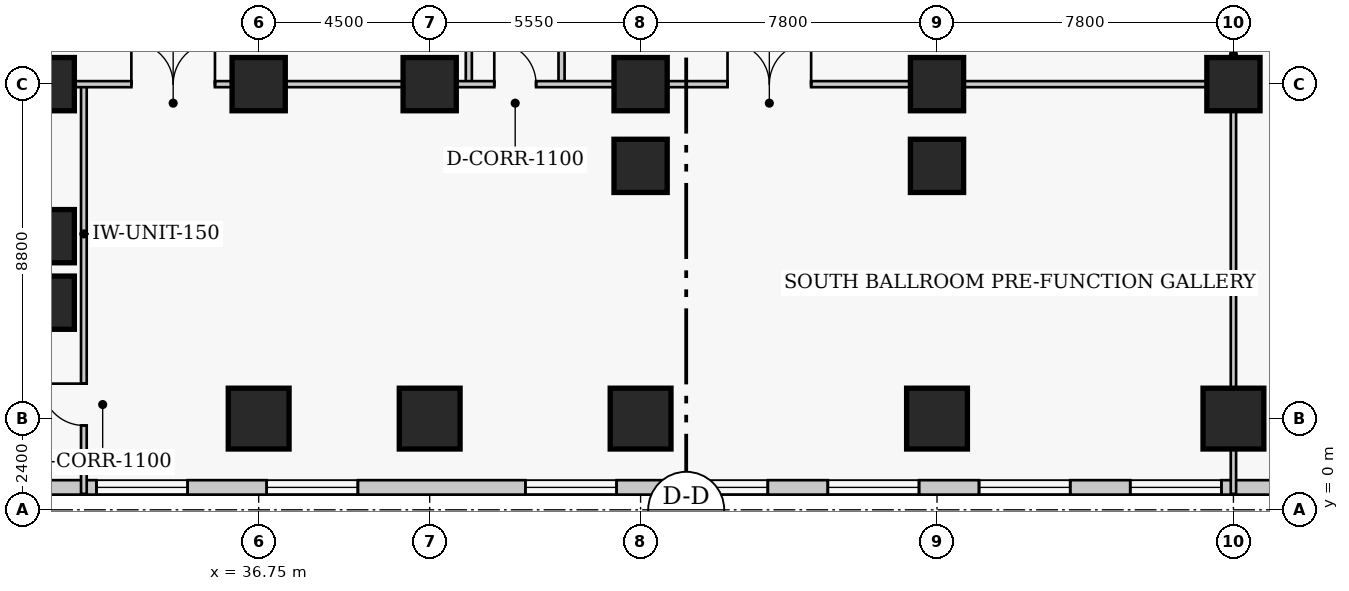
"""IFC4 building model, lengths in metres.
Left out: names, types, materials, properties, quantities, classifications, styles, units other than length and angle.
Written with IfcOpenShell. Run it as: python <this file> out.ifc"""

import sys

from ifc_helpers import new_model, si_unit, direction, frame, frame_2d, origin, origin_2d, place, context, subcontext, project, spatial, rectangle, extrude, element, fill, save


model = new_model("IFC4")
c1 = context("Model", 3, precision=1e-05, world=origin(), true_north=direction((0.0, 1.0)))
c2 = subcontext(c1, "Body", "Model", "MODEL_VIEW")
j1 = project(units=[si_unit("LENGTHUNIT", "METRE"), si_unit("PLANEANGLEUNIT", "RADIAN")], contexts=[c1])
p1 = place(None, origin())
s1 = spatial("IfcSite", under=j1, at=p1, CompositionType="ELEMENT")
p2 = place(p1, origin())
s2 = spatial("IfcBuilding", under=s1, at=p2, CompositionType="ELEMENT")
p3 = place(p2, frame((0.0, 0.0, 10.4)))
s3 = spatial("IfcBuildingStorey", under=s2, at=p3, CompositionType="ELEMENT", Elevation=10.4)
p4 = place(p3, frame((31.2, 11.2, 0.0), z_axis=(0.0, 0.0, 1.0), x_axis=(1.0, 0.0, 0.0)))
e1 = element("IfcColumn", 1, at=p4, inside=s3, PredefinedType="COLUMN", context=c2, shape_type="SweptSolid", body=[
    extrude(rectangle(XDim=1.4, YDim=1.4, at=origin_2d()), origin(), (0.0, 0.0, 1.0), 5.4),
])
p5 = place(p3, frame((36.75, 2.4, 0.0), z_axis=(0.0, 0.0, 1.0), x_axis=(1.0, 0.0, 0.0)))
e2 = element("IfcColumn", 2, at=p5, inside=s3, PredefinedType="COLUMN", context=c2, shape_type="SweptSolid", body=[
    extrude(rectangle(XDim=1.6, YDim=1.6, at=origin_2d()), origin(), (0.0, 0.0, 1.0), 5.4),
])
p6 = place(p3, frame((36.75, 11.2, 0.0), z_axis=(0.0, 0.0, 1.0), x_axis=(1.0, 0.0, 0.0)))
e3 = element("IfcColumn", 3, at=p6, inside=s3, PredefinedType="COLUMN", context=c2, shape_type="SweptSolid", body=[
    extrude(rectangle(XDim=1.4, YDim=1.4, at=origin_2d()), origin(), (0.0, 0.0, 1.0), 5.4),
])
p7 = place(p3, frame((41.25, 2.4, 0.0), z_axis=(0.0, 0.0, 1.0), x_axis=(1.0, 0.0, 0.0)))
e4 = element("IfcColumn", 4, at=p7, inside=s3, PredefinedType="COLUMN", context=c2, shape_type="SweptSolid", body=[
    extrude(rectangle(XDim=1.6, YDim=1.6, at=origin_2d()), origin(), (0.0, 0.0, 1.0), 5.4),
])
p8 = place(p3, frame((41.25, 11.2, 0.0), z_axis=(0.0, 0.0, 1.0), x_axis=(1.0, 0.0, 0.0)))
e5 = element("IfcColumn", 5, at=p8, inside=s3, PredefinedType="COLUMN", context=c2, shape_type="SweptSolid", body=[
    extrude(rectangle(XDim=1.4, YDim=1.4, at=origin_2d()), origin(), (0.0, 0.0, 1.0), 5.4),
])
p9 = place(p3, frame((46.8, 2.4, 0.0), z_axis=(0.0, 0.0, 1.0), x_axis=(1.0, 0.0, 0.0)))
e6 = element("IfcColumn", 6, at=p9, inside=s3, PredefinedType="COLUMN", context=c2, shape_type="SweptSolid", body=[
    extrude(rectangle(XDim=1.6, YDim=1.6, at=origin_2d()), origin(), (0.0, 0.0, 1.0), 5.4),
])
p10 = place(p3, frame((46.8, 11.2, 0.0), z_axis=(0.0, 0.0, 1.0), x_axis=(1.0, 0.0, 0.0)))
e7 = element("IfcColumn", 7, at=p10, inside=s3, PredefinedType="COLUMN", context=c2, shape_type="SweptSolid", body=[
    extrude(rectangle(XDim=1.4, YDim=1.4, at=origin_2d()), origin(), (0.0, 0.0, 1.0), 5.4),
])
p11 = place(p3, frame((54.6, 2.4, 0.0), z_axis=(0.0, 0.0, 1.0), x_axis=(1.0, 0.0, 0.0)))
e8 = element("IfcColumn", 8, at=p11, inside=s3, PredefinedType="COLUMN", context=c2, shape_type="SweptSolid", body=[
    extrude(rectangle(XDim=1.6, YDim=1.6, at=origin_2d()), origin(), (0.0, 0.0, 1.0), 5.4),
])
p12 = place(p3, frame((54.6, 11.2, 0.0), z_axis=(0.0, 0.0, 1.0), x_axis=(1.0, 0.0, 0.0)))
e9 = element("IfcColumn", 9, at=p12, inside=s3, PredefinedType="COLUMN", context=c2, shape_type="SweptSolid", body=[
    extrude(rectangle(XDim=1.4, YDim=1.4, at=origin_2d()), origin(), (0.0, 0.0, 1.0), 5.4),
])
p13 = place(p3, frame((62.4, 2.4, 0.0), z_axis=(0.0, 0.0, 1.0), x_axis=(1.0, 0.0, 0.0)))
e10 = element("IfcColumn", 10, at=p13, inside=s3, PredefinedType="COLUMN", context=c2, shape_type="SweptSolid", body=[
    extrude(rectangle(XDim=1.6, YDim=1.6, at=origin_2d()), origin(), (0.0, 0.0, 1.0), 5.4),
])
for number, where, z_axis, x_axis in (
    (11, (62.4, 11.2, 0.0), (0.0, 0.0, 1.0), (1.0, 0.0, 0.0)),
    (12, (31.2, 7.2, 0.0), (0.0, 0.0, 1.0), (1.0, 0.0, 0.0)),
    (13, (31.2, 5.45, 0.0), (0.0, 0.0, 1.0), (1.0, 0.0, 0.0)),
    (14, (46.8, 9.05, 0.0), (0.0, 0.0, 1.0), (1.0, 0.0, 0.0)),
    (15, (54.6, 9.05, 0.0), (0.0, 0.0, 1.0), (1.0, 0.0, 0.0)),
):
    element("IfcColumn", number, at=place(p3, frame(where, z_axis=z_axis, x_axis=x_axis)), inside=s3, PredefinedType="COLUMN", context=c2, shape_type="SweptSolid", body=[
        extrude(rectangle(XDim=1.4, YDim=1.4, at=origin_2d()), origin(), (0.0, 0.0, 1.0), 5.4),
    ])
p14 = place(p3, frame((-0.79, 0.59, 0.0), z_axis=(0.0, 0.0, 1.0), x_axis=(1.0, 0.0, 0.0)))
e16 = element("IfcWall", 16, at=p14, inside=s3, PredefinedType="SOLIDWALL", context=c2, shape_type="SweptSolid", body=[
    extrude(rectangle(XDim=79.58, YDim=0.38, at=frame_2d((39.79, 0.0))), origin(), (0.0, 0.0, 1.0), 5.1),
])
p15 = place(p14, frame((1.439, 0.0, 0.75)))
e17 = element("IfcOpeningElement", 17, at=p15, cuts=e16, PredefinedType="OPENING", context=c2, shape_type="SweptSolid", body=[
    extrude(rectangle(XDim=2.4, YDim=2.2, at=frame_2d((1.2, 1.1))), frame((0.0, 0.2, 0.0), z_axis=(0.0, -1.0, 0.0), x_axis=(1.0, 0.0, 0.0)), (0.0, 0.0, 1.0), 0.4),
])
p16 = place(p14, frame((4.769, 0.0, 0.75)))
e18 = element("IfcOpeningElement", 18, at=p16, cuts=e16, PredefinedType="OPENING", context=c2, shape_type="SweptSolid", body=[
    extrude(rectangle(XDim=2.4, YDim=2.2, at=frame_2d((1.2, 1.1))), frame((0.0, 0.2, 0.0), z_axis=(0.0, -1.0, 0.0), x_axis=(1.0, 0.0, 0.0)), (0.0, 0.0, 1.0), 0.4),
])
p17 = place(p14, frame((16.706, 0.0, 0.75)))
e19 = element("IfcOpeningElement", 19, at=p17, cuts=e16, PredefinedType="OPENING", context=c2, shape_type="SweptSolid", body=[
    extrude(rectangle(XDim=2.4, YDim=2.2, at=frame_2d((1.2, 1.1))), frame((0.0, 0.2, 0.0), z_axis=(0.0, -1.0, 0.0), x_axis=(1.0, 0.0, 0.0)), (0.0, 0.0, 1.0), 0.4),
])
p18 = place(p14, frame((20.685, 0.0, 0.75)))
e20 = element("IfcOpeningElement", 20, at=p18, cuts=e16, PredefinedType="OPENING", context=c2, shape_type="SweptSolid", body=[
    extrude(rectangle(XDim=2.4, YDim=2.2, at=frame_2d((1.2, 1.1))), frame((0.0, 0.2, 0.0), z_axis=(0.0, -1.0, 0.0), x_axis=(1.0, 0.0, 0.0)), (0.0, 0.0, 1.0), 0.4),
])
p19 = place(p14, frame((24.664, 0.0, 0.75)))
e21 = element("IfcOpeningElement", 21, at=p19, cuts=e16, PredefinedType="OPENING", context=c2, shape_type="SweptSolid", body=[
    extrude(rectangle(XDim=2.4, YDim=2.2, at=frame_2d((1.2, 1.1))), frame((0.0, 0.2, 0.0), z_axis=(0.0, -1.0, 0.0), x_axis=(1.0, 0.0, 0.0)), (0.0, 0.0, 1.0), 0.4),
])
p20 = place(p14, frame((28.643, 0.0, 0.75)))
e22 = element("IfcOpeningElement", 22, at=p20, cuts=e16, PredefinedType="OPENING", context=c2, shape_type="SweptSolid", body=[
    extrude(rectangle(XDim=2.4, YDim=2.2, at=frame_2d((1.2, 1.1))), frame((0.0, 0.2, 0.0), z_axis=(0.0, -1.0, 0.0), x_axis=(1.0, 0.0, 0.0)), (0.0, 0.0, 1.0), 0.4),
])
p21 = place(p14, frame((33.271, 0.0, 0.75)))
e23 = element("IfcOpeningElement", 23, at=p21, cuts=e16, PredefinedType="OPENING", context=c2, shape_type="SweptSolid", body=[
    extrude(rectangle(XDim=2.4, YDim=2.2, at=frame_2d((1.2, 1.1))), frame((0.0, 0.2, 0.0), z_axis=(0.0, -1.0, 0.0), x_axis=(1.0, 0.0, 0.0)), (0.0, 0.0, 1.0), 0.4),
])
p22 = place(p14, frame((37.75, 0.0, 0.75)))
e24 = element("IfcOpeningElement", 24, at=p22, cuts=e16, PredefinedType="OPENING", context=c2, shape_type="SweptSolid", body=[
    extrude(rectangle(XDim=2.4, YDim=2.2, at=frame_2d((1.2, 1.1))), frame((0.0, 0.2, 0.0), z_axis=(0.0, -1.0, 0.0), x_axis=(1.0, 0.0, 0.0)), (0.0, 0.0, 1.0), 0.4),
])
p23 = place(p14, frame((44.559, 0.0, 0.75)))
e25 = element("IfcOpeningElement", 25, at=p23, cuts=e16, PredefinedType="OPENING", context=c2, shape_type="SweptSolid", body=[
    extrude(rectangle(XDim=2.4, YDim=2.2, at=frame_2d((1.2, 1.1))), frame((0.0, 0.2, 0.0), z_axis=(0.0, -1.0, 0.0), x_axis=(1.0, 0.0, 0.0)), (0.0, 0.0, 1.0), 0.4),
])
p24 = place(p14, frame((48.538, 0.0, 0.75)))
e26 = element("IfcOpeningElement", 26, at=p24, cuts=e16, PredefinedType="OPENING", context=c2, shape_type="SweptSolid", body=[
    extrude(rectangle(XDim=2.4, YDim=2.2, at=frame_2d((1.2, 1.1))), frame((0.0, 0.2, 0.0), z_axis=(0.0, -1.0, 0.0), x_axis=(1.0, 0.0, 0.0)), (0.0, 0.0, 1.0), 0.4),
])
p25 = place(p14, frame((52.517, 0.0, 0.75)))
e27 = element("IfcOpeningElement", 27, at=p25, cuts=e16, PredefinedType="OPENING", context=c2, shape_type="SweptSolid", body=[
    extrude(rectangle(XDim=2.4, YDim=2.2, at=frame_2d((1.2, 1.1))), frame((0.0, 0.2, 0.0), z_axis=(0.0, -1.0, 0.0), x_axis=(1.0, 0.0, 0.0)), (0.0, 0.0, 1.0), 0.4),
])
p26 = place(p14, frame((56.496, 0.0, 0.75)))
e28 = element("IfcOpeningElement", 28, at=p26, cuts=e16, PredefinedType="OPENING", context=c2, shape_type="SweptSolid", body=[
    extrude(rectangle(XDim=2.4, YDim=2.2, at=frame_2d((1.2, 1.1))), frame((0.0, 0.2, 0.0), z_axis=(0.0, -1.0, 0.0), x_axis=(1.0, 0.0, 0.0)), (0.0, 0.0, 1.0), 0.4),
])
p27 = place(p14, frame((60.475, 0.0, 0.75)))
e29 = element("IfcOpeningElement", 29, at=p27, cuts=e16, PredefinedType="OPENING", context=c2, shape_type="SweptSolid", body=[
    extrude(rectangle(XDim=2.4, YDim=2.2, at=frame_2d((1.2, 1.1))), frame((0.0, 0.2, 0.0), z_axis=(0.0, -1.0, 0.0), x_axis=(1.0, 0.0, 0.0)), (0.0, 0.0, 1.0), 0.4),
])
p28 = place(p14, frame((64.454, 0.0, 0.75)))
e30 = element("IfcOpeningElement", 30, at=p28, cuts=e16, PredefinedType="OPENING", context=c2, shape_type="SweptSolid", body=[
    extrude(rectangle(XDim=2.4, YDim=2.2, at=frame_2d((1.2, 1.1))), frame((0.0, 0.2, 0.0), z_axis=(0.0, -1.0, 0.0), x_axis=(1.0, 0.0, 0.0)), (0.0, 0.0, 1.0), 0.4),
])
p29 = place(p14, frame((68.433, 0.0, 0.75)))
e31 = element("IfcOpeningElement", 31, at=p29, cuts=e16, PredefinedType="OPENING", context=c2, shape_type="SweptSolid", body=[
    extrude(rectangle(XDim=2.4, YDim=2.2, at=frame_2d((1.2, 1.1))), frame((0.0, 0.2, 0.0), z_axis=(0.0, -1.0, 0.0), x_axis=(1.0, 0.0, 0.0)), (0.0, 0.0, 1.0), 0.4),
])
p30 = place(p14, frame((72.412, 0.0, 0.75)))
e32 = element("IfcOpeningElement", 32, at=p30, cuts=e16, PredefinedType="OPENING", context=c2, shape_type="SweptSolid", body=[
    extrude(rectangle(XDim=2.4, YDim=2.2, at=frame_2d((1.2, 1.1))), frame((0.0, 0.2, 0.0), z_axis=(0.0, -1.0, 0.0), x_axis=(1.0, 0.0, 0.0)), (0.0, 0.0, 1.0), 0.4),
])
p31 = place(p14, frame((75.74, 0.0, 0.75)))
e33 = element("IfcOpeningElement", 33, at=p31, cuts=e16, PredefinedType="OPENING", context=c2, shape_type="SweptSolid", body=[
    extrude(rectangle(XDim=2.4, YDim=2.2, at=frame_2d((1.2, 1.1))), frame((0.0, 0.2, 0.0), z_axis=(0.0, -1.0, 0.0), x_axis=(1.0, 0.0, 0.0)), (0.0, 0.0, 1.0), 0.4),
])
for number, where, z_axis, x_axis in (
    (34, (42.28, 11.2, 0.0), (0.0, 0.0, 1.0), (0.0, 1.0, 0.0)),
    (35, (44.72, 11.2, 0.0), (0.0, 0.0, 1.0), (0.0, 1.0, 0.0)),
):
    element("IfcWall", number, at=place(p3, frame(where, z_axis=z_axis, x_axis=x_axis)), inside=s3, PredefinedType="PARTITIONING", context=c2, shape_type="SweptSolid", body=[
        extrude(rectangle(XDim=12.32, YDim=0.16, at=frame_2d((6.16, 0.0))), origin(), (0.0, 0.0, 1.0), 5.1),
    ])
p32 = place(p3, frame((32.15, 0.42, 0.0), z_axis=(0.0, 0.0, 1.0), x_axis=(0.0, 1.0, 0.0)))
e36 = element("IfcWall", 36, at=p32, inside=s3, PredefinedType="PARTITIONING", context=c2, shape_type="SweptSolid", body=[
    extrude(rectangle(XDim=10.78, YDim=0.15, at=frame_2d((5.39, 0.0))), origin(), (0.0, 0.0, 1.0), 5.1),
])
p33 = place(p32, frame((1.8, 0.0, 0.0)))
e37 = element("IfcOpeningElement", 37, at=p33, cuts=e36, PredefinedType="OPENING", context=c2, shape_type="SweptSolid", body=[
    extrude(rectangle(XDim=1.1, YDim=2.15, at=frame_2d((0.55, 1.075))), frame((0.0, 0.085, 0.0), z_axis=(0.0, -1.0, 0.0), x_axis=(1.0, 0.0, 0.0)), (0.0, 0.0, 1.0), 0.17),
])
p34 = place(p3, frame((14.4, 11.2, 0.0), z_axis=(0.0, 0.0, 1.0), x_axis=(1.0, 0.0, 0.0)))
e38 = element("IfcWall", 38, at=p34, inside=s3, PredefinedType="PARTITIONING", context=c2, shape_type="SweptSolid", body=[
    extrude(rectangle(XDim=48.0, YDim=0.16, at=frame_2d((24.0, 0.0))), origin(), (0.0, 0.0, 1.0), 4.06),
])
p35 = place(p34, frame((28.55, 0.0, 0.0)))
e39 = element("IfcOpeningElement", 39, at=p35, cuts=e38, PredefinedType="OPENING", context=c2, shape_type="SweptSolid", body=[
    extrude(rectangle(XDim=1.1, YDim=2.15, at=frame_2d((0.55, 1.075))), frame((0.0, 0.09, 0.0), z_axis=(0.0, -1.0, 0.0), x_axis=(1.0, 0.0, 0.0)), (0.0, 0.0, 1.0), 0.18),
])
p36 = place(p34, frame((19.0, 0.0, 0.0)))
e40 = element("IfcOpeningElement", 40, at=p36, cuts=e38, PredefinedType="OPENING", context=c2, shape_type="SweptSolid", body=[
    extrude(rectangle(XDim=2.2, YDim=2.4, at=frame_2d((1.1, 1.2))), frame((0.0, 0.09, 0.0), z_axis=(0.0, -1.0, 0.0), x_axis=(1.0, 0.0, 0.0)), (0.0, 0.0, 1.0), 0.18),
])
p37 = place(p34, frame((34.688, 0.0, 0.0)))
e41 = element("IfcOpeningElement", 41, at=p37, cuts=e38, PredefinedType="OPENING", context=c2, shape_type="SweptSolid", body=[
    extrude(rectangle(XDim=2.2, YDim=2.4, at=frame_2d((1.1, 1.2))), frame((0.0, 0.09, 0.0), z_axis=(0.0, -1.0, 0.0), x_axis=(1.0, 0.0, 0.0)), (0.0, 0.0, 1.0), 0.18),
])
p38 = place(p3, frame((62.4, 0.42, 0.0), z_axis=(0.0, 0.0, 1.0), x_axis=(0.0, 1.0, 0.0)))
e42 = element("IfcWall", 42, at=p38, inside=s3, PredefinedType="PLUMBINGWALL", context=c2, shape_type="SweptSolid", body=[
    extrude(rectangle(XDim=23.1, YDim=0.14, at=frame_2d((11.55, 0.0))), origin(), (0.0, 0.0, 1.0), 4.35),
])
p39 = place(p21, origin())
e43 = element("IfcWindow", 43, at=p39, inside=s3, PartitioningType="SINGLE_PANEL", PredefinedType="WINDOW", context=c2, shape_type="SweptSolid", body=[
    extrude(rectangle(XDim=2.4, YDim=2.2, at=frame_2d((1.2, 1.1))), frame((0.0, 0.03, 0.0), z_axis=(0.0, -1.0, 0.0), x_axis=(1.0, 0.0, 0.0)), (0.0, 0.0, 1.0), 0.06),
])
fill(e23, e43)
p40 = place(p22, origin())
e44 = element("IfcWindow", 44, at=p40, inside=s3, PartitioningType="SINGLE_PANEL", PredefinedType="WINDOW", context=c2, shape_type="SweptSolid", body=[
    extrude(rectangle(XDim=2.4, YDim=2.2, at=frame_2d((1.2, 1.1))), frame((0.0, 0.03, 0.0), z_axis=(0.0, -1.0, 0.0), x_axis=(1.0, 0.0, 0.0)), (0.0, 0.0, 1.0), 0.06),
])
fill(e24, e44)
p41 = place(p23, origin())
e45 = element("IfcWindow", 45, at=p41, inside=s3, PartitioningType="SINGLE_PANEL", PredefinedType="WINDOW", context=c2, shape_type="SweptSolid", body=[
    extrude(rectangle(XDim=2.4, YDim=2.2, at=frame_2d((1.2, 1.1))), frame((0.0, 0.03, 0.0), z_axis=(0.0, -1.0, 0.0), x_axis=(1.0, 0.0, 0.0)), (0.0, 0.0, 1.0), 0.06),
])
fill(e25, e45)
p42 = place(p24, origin())
e46 = element("IfcWindow", 46, at=p42, inside=s3, PartitioningType="SINGLE_PANEL", PredefinedType="WINDOW", context=c2, shape_type="SweptSolid", body=[
    extrude(rectangle(XDim=2.4, YDim=2.2, at=frame_2d((1.2, 1.1))), frame((0.0, 0.03, 0.0), z_axis=(0.0, -1.0, 0.0), x_axis=(1.0, 0.0, 0.0)), (0.0, 0.0, 1.0), 0.06),
])
fill(e26, e46)
p43 = place(p25, origin())
e47 = element("IfcWindow", 47, at=p43, inside=s3, PartitioningType="SINGLE_PANEL", PredefinedType="WINDOW", context=c2, shape_type="SweptSolid", body=[
    extrude(rectangle(XDim=2.4, YDim=2.2, at=frame_2d((1.2, 1.1))), frame((0.0, 0.03, 0.0), z_axis=(0.0, -1.0, 0.0), x_axis=(1.0, 0.0, 0.0)), (0.0, 0.0, 1.0), 0.06),
])
fill(e27, e47)
p44 = place(p26, origin())
e48 = element("IfcWindow", 48, at=p44, inside=s3, PartitioningType="SINGLE_PANEL", PredefinedType="WINDOW", context=c2, shape_type="SweptSolid", body=[
    extrude(rectangle(XDim=2.4, YDim=2.2, at=frame_2d((1.2, 1.1))), frame((0.0, 0.03, 0.0), z_axis=(0.0, -1.0, 0.0), x_axis=(1.0, 0.0, 0.0)), (0.0, 0.0, 1.0), 0.06),
])
fill(e28, e48)
p45 = place(p27, origin())
e49 = element("IfcWindow", 49, at=p45, inside=s3, PartitioningType="SINGLE_PANEL", PredefinedType="WINDOW", context=c2, shape_type="SweptSolid", body=[
    extrude(rectangle(XDim=2.4, YDim=2.2, at=frame_2d((1.2, 1.1))), frame((0.0, 0.03, 0.0), z_axis=(0.0, -1.0, 0.0), x_axis=(1.0, 0.0, 0.0)), (0.0, 0.0, 1.0), 0.06),
])
fill(e29, e49)
p46 = place(p35, origin())
e50 = element("IfcDoor", 50, at=p46, inside=s3, OperationType="SINGLE_SWING_LEFT", PredefinedType="DOOR", context=c2, shape_type="SweptSolid", body=[
    extrude(rectangle(XDim=1.1, YDim=2.15, at=frame_2d((0.55, 1.075))), frame((0.0, 0.025, 0.0), z_axis=(0.0, -1.0, 0.0), x_axis=(1.0, 0.0, 0.0)), (0.0, 0.0, 1.0), 0.05),
])
fill(e39, e50)
p47 = place(p33, origin())
e51 = element("IfcDoor", 51, at=p47, inside=s3, OperationType="SINGLE_SWING_RIGHT", PredefinedType="DOOR", context=c2, shape_type="SweptSolid", body=[
    extrude(rectangle(XDim=1.1, YDim=2.15, at=frame_2d((0.55, 1.075))), frame((0.0, 0.025, 0.0), z_axis=(0.0, -1.0, 0.0), x_axis=(1.0, 0.0, 0.0)), (0.0, 0.0, 1.0), 0.05),
])
fill(e37, e51)
p48 = place(p36, origin())
e52 = element("IfcDoor", 52, at=p48, inside=s3, OperationType="DOUBLE_DOOR_SINGLE_SWING", PredefinedType="DOOR", context=c2, shape_type="SweptSolid", body=[
    extrude(rectangle(XDim=2.2, YDim=2.4, at=frame_2d((1.1, 1.2))), frame((0.0, 0.025, 0.0), z_axis=(0.0, -1.0, 0.0), x_axis=(1.0, 0.0, 0.0)), (0.0, 0.0, 1.0), 0.05),
])
fill(e40, e52)
p49 = place(p37, origin())
e53 = element("IfcDoor", 53, at=p49, inside=s3, OperationType="DOUBLE_DOOR_SINGLE_SWING", PredefinedType="DOOR", context=c2, shape_type="SweptSolid", body=[
    extrude(rectangle(XDim=2.2, YDim=2.4, at=frame_2d((1.1, 1.2))), frame((0.0, 0.025, 0.0), z_axis=(0.0, -1.0, 0.0), x_axis=(1.0, 0.0, 0.0)), (0.0, 0.0, 1.0), 0.05),
])
fill(e41, e53)
save(model, sys.argv[1])
